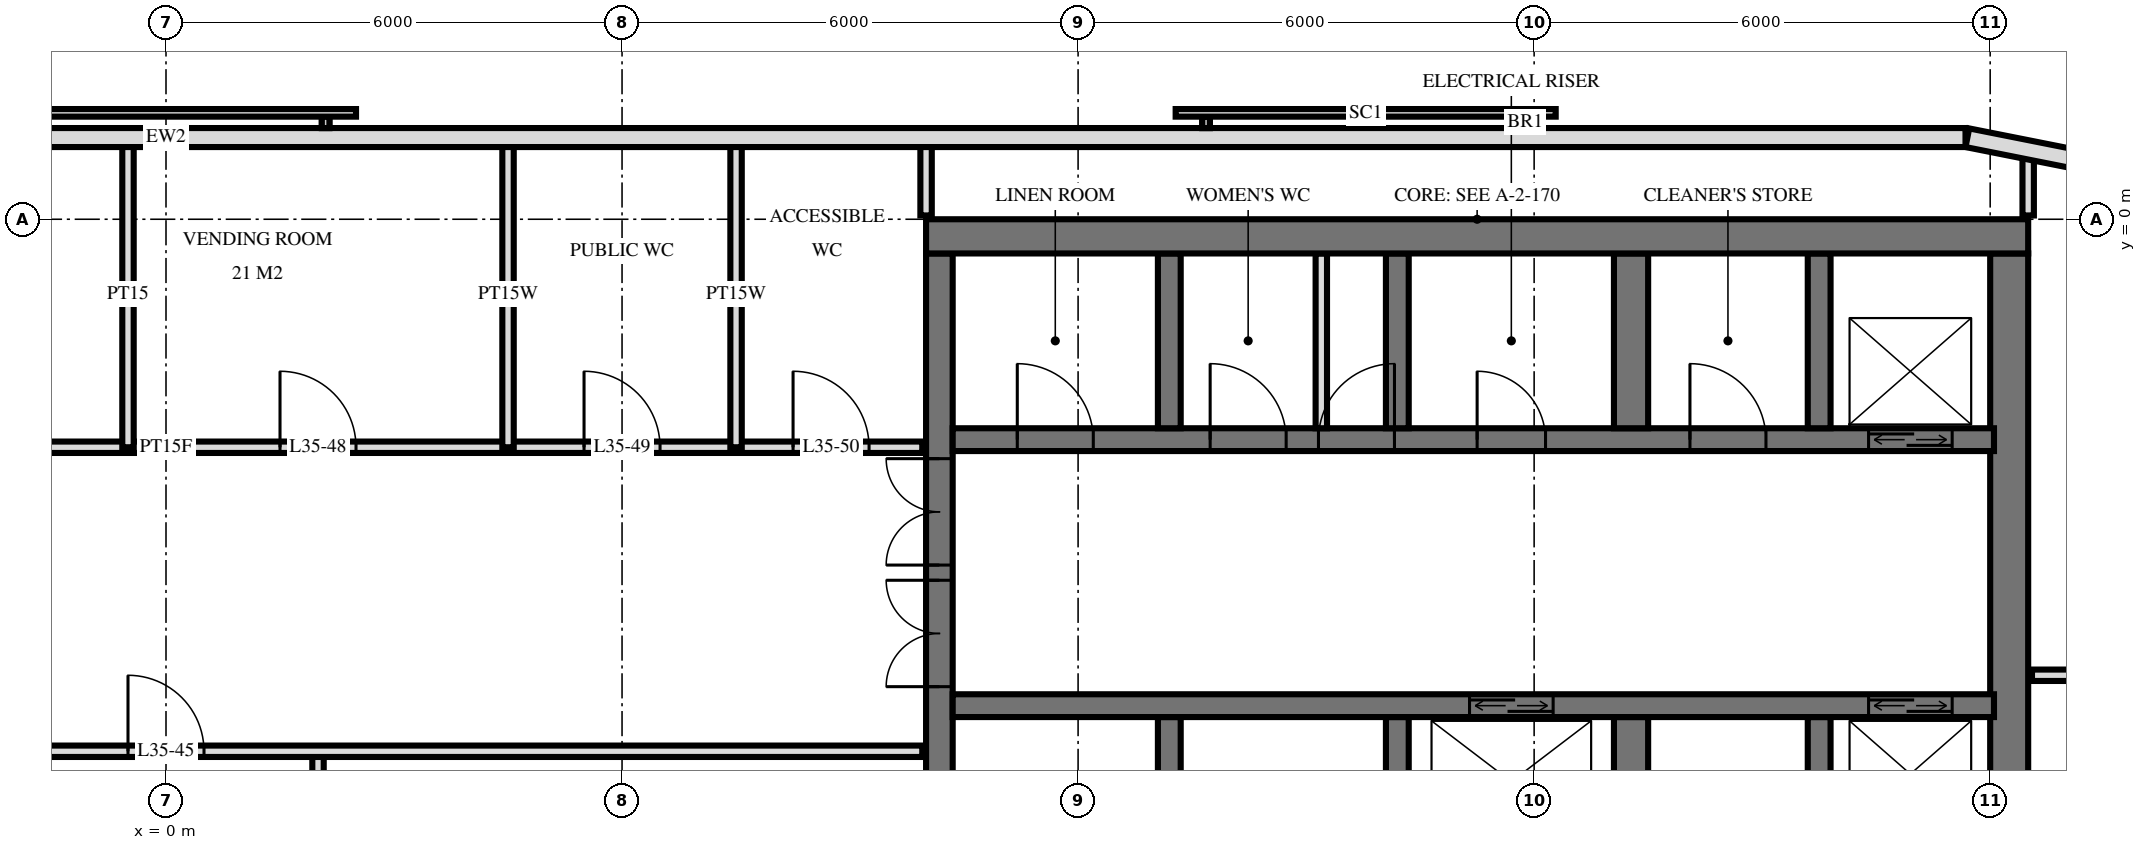
"""IFC4 building model, lengths in metres.
Left out: names, types, materials, properties, quantities, classifications, styles, units other than length and angle.
Written with IfcOpenShell. Run it as: python <this file> out.ifc"""

import sys

from ifc_helpers import new_model, si_unit, direction, frame, frame_2d, origin, place, context, subcontext, project, spatial, rectangle, extrude, element, fill, save


model = new_model("IFC4")
c1 = context("Model", 3, precision=1e-05, world=origin(), true_north=direction((0.0, 1.0)))
c2 = subcontext(c1, "Body", "Model", "MODEL_VIEW")
j1 = project(units=[si_unit("LENGTHUNIT", "METRE"), si_unit("PLANEANGLEUNIT", "RADIAN")], contexts=[c1])
p1 = place(None, origin())
s1 = spatial("IfcSite", under=j1, at=p1, CompositionType="ELEMENT")
p2 = place(p1, origin())
s2 = spatial("IfcBuilding", under=s1, at=p2, CompositionType="ELEMENT")
p3 = place(p2, frame((0.0, 0.0, 138.0)))
s3 = spatial("IfcBuildingStorey", under=s2, at=p3, CompositionType="ELEMENT", Elevation=138.0)
p4 = place(p3, frame((10.0, -0.225, 0.0), z_axis=(0.0, 0.0, 1.0), x_axis=(1.0, 0.0, 0.0)))
e1 = element("IfcWall", 1, at=p4, inside=s3, PredefinedType="SHEAR", context=c2, shape_type="SweptSolid", body=[
    extrude(rectangle(XDim=14.5, YDim=0.45, at=frame_2d((7.25, 0.0))), origin(), (0.0, 0.0, 1.0), 3.6),
])
p5 = place(p3, frame((10.175, -14.55, 0.0), z_axis=(0.0, 0.0, 1.0), x_axis=(0.0, 1.0, 0.0)))
e2 = element("IfcWall", 2, at=p5, inside=s3, PredefinedType="SHEAR", context=c2, shape_type="SweptSolid", body=[
    extrude(rectangle(XDim=14.1, YDim=0.35, at=frame_2d((7.05, 0.0))), origin(), (0.0, 0.0, 1.0), 3.6),
])
p6 = place(p5, frame((8.4, 0.0, 0.0)))
e3 = element("IfcOpeningElement", 3, at=p6, cuts=e2, PredefinedType="OPENING", context=c2, shape_type="SweptSolid", body=[
    extrude(rectangle(XDim=1.4, YDim=2.4, at=frame_2d((0.7, 1.2))), frame((0.0, 0.185, 0.0), z_axis=(0.0, -1.0, 0.0), x_axis=(1.0, 0.0, 0.0)), (0.0, 0.0, 1.0), 0.37),
])
p7 = place(p5, frame((10.0, 0.0, 0.0)))
e4 = element("IfcOpeningElement", 4, at=p7, cuts=e2, PredefinedType="OPENING", context=c2, shape_type="SweptSolid", body=[
    extrude(rectangle(XDim=1.4, YDim=2.4, at=frame_2d((0.7, 1.2))), frame((0.0, 0.185, 0.0), z_axis=(0.0, -1.0, 0.0), x_axis=(1.0, 0.0, 0.0)), (0.0, 0.0, 1.0), 0.37),
])
p8 = place(p5, frame((4.0, 0.0, 0.0)))
e5 = element("IfcOpeningElement", 5, at=p8, cuts=e2, PredefinedType="OPENING", context=c2, shape_type="SweptSolid", body=[
    extrude(rectangle(XDim=1.2, YDim=2.1, at=frame_2d((0.6, 1.05))), frame((0.0, 0.185, 0.0), z_axis=(0.0, -1.0, 0.0), x_axis=(1.0, 0.0, 0.0)), (0.0, 0.0, 1.0), 0.37),
])
p9 = place(p3, frame((24.25, -14.55, 0.0), z_axis=(0.0, 0.0, 1.0), x_axis=(0.0, 1.0, 0.0)))
e6 = element("IfcWall", 6, at=p9, inside=s3, PredefinedType="SHEAR", context=c2, shape_type="SweptSolid", body=[
    extrude(rectangle(XDim=14.1, YDim=0.5, at=frame_2d((7.05, 0.0))), origin(), (0.0, 0.0, 1.0), 3.6),
])
p10 = place(p3, frame((10.35, -2.9, 0.0), z_axis=(0.0, 0.0, 1.0), x_axis=(1.0, 0.0, 0.0)))
e7 = element("IfcWall", 7, at=p10, inside=s3, PredefinedType="SHEAR", context=c2, shape_type="SweptSolid", body=[
    extrude(rectangle(XDim=13.7, YDim=0.3, at=frame_2d((6.85, 0.0))), origin(), (0.0, 0.0, 1.0), 3.6),
])
p11 = place(p10, frame((12.05, 0.0, 0.0)))
e8 = element("IfcOpeningElement", 8, at=p11, cuts=e7, PredefinedType="OPENING", context=c2, shape_type="SweptSolid", body=[
    extrude(rectangle(XDim=1.1, YDim=2.1, at=frame_2d((0.55, 1.05))), frame((0.0, 0.16, 0.0), z_axis=(0.0, -1.0, 0.0), x_axis=(1.0, 0.0, 0.0)), (0.0, 0.0, 1.0), 0.32),
])
p12 = place(p10, frame((6.9, 0.0, 0.0)))
e9 = element("IfcOpeningElement", 9, at=p12, cuts=e7, PredefinedType="OPENING", context=c2, shape_type="SweptSolid", body=[
    extrude(rectangle(XDim=0.9, YDim=2.1, at=frame_2d((0.45, 1.05))), frame((0.0, 0.16, 0.0), z_axis=(0.0, -1.0, 0.0), x_axis=(1.0, 0.0, 0.0)), (0.0, 0.0, 1.0), 0.32),
])
p13 = place(p10, frame((0.85, 0.0, 0.0)))
e10 = element("IfcOpeningElement", 10, at=p13, cuts=e7, PredefinedType="OPENING", context=c2, shape_type="SweptSolid", body=[
    extrude(rectangle(XDim=1.0, YDim=2.1, at=frame_2d((0.5, 1.05))), frame((0.0, 0.16, 0.0), z_axis=(0.0, -1.0, 0.0), x_axis=(1.0, 0.0, 0.0)), (0.0, 0.0, 1.0), 0.32),
])
p14 = place(p10, frame((3.387, 0.0, 0.0)))
e11 = element("IfcOpeningElement", 11, at=p14, cuts=e7, PredefinedType="OPENING", context=c2, shape_type="SweptSolid", body=[
    extrude(rectangle(XDim=1.0, YDim=2.1, at=frame_2d((0.5, 1.05))), frame((0.0, 0.16, 0.0), z_axis=(0.0, -1.0, 0.0), x_axis=(1.0, 0.0, 0.0)), (0.0, 0.0, 1.0), 0.32),
])
p15 = place(p10, frame((4.812, 0.0, 0.0)))
e12 = element("IfcOpeningElement", 12, at=p15, cuts=e7, PredefinedType="OPENING", context=c2, shape_type="SweptSolid", body=[
    extrude(rectangle(XDim=1.0, YDim=2.1, at=frame_2d((0.5, 1.05))), frame((0.0, 0.16, 0.0), z_axis=(0.0, -1.0, 0.0), x_axis=(1.0, 0.0, 0.0)), (0.0, 0.0, 1.0), 0.32),
])
p16 = place(p10, frame((9.7, 0.0, 0.0)))
e13 = element("IfcOpeningElement", 13, at=p16, cuts=e7, PredefinedType="OPENING", context=c2, shape_type="SweptSolid", body=[
    extrude(rectangle(XDim=1.0, YDim=2.1, at=frame_2d((0.5, 1.05))), frame((0.0, 0.16, 0.0), z_axis=(0.0, -1.0, 0.0), x_axis=(1.0, 0.0, 0.0)), (0.0, 0.0, 1.0), 0.32),
])
p17 = place(p3, frame((10.35, -6.4, 0.0), z_axis=(0.0, 0.0, 1.0), x_axis=(1.0, 0.0, 0.0)))
e14 = element("IfcWall", 14, at=p17, inside=s3, PredefinedType="SHEAR", context=c2, shape_type="SweptSolid", body=[
    extrude(rectangle(XDim=13.7, YDim=0.3, at=frame_2d((6.85, 0.0))), origin(), (0.0, 0.0, 1.0), 3.6),
])
p18 = place(p17, frame((12.05, 0.0, 0.0)))
e15 = element("IfcOpeningElement", 15, at=p18, cuts=e14, PredefinedType="OPENING", context=c2, shape_type="SweptSolid", body=[
    extrude(rectangle(XDim=1.1, YDim=2.1, at=frame_2d((0.55, 1.05))), frame((0.0, 0.16, 0.0), z_axis=(0.0, -1.0, 0.0), x_axis=(1.0, 0.0, 0.0)), (0.0, 0.0, 1.0), 0.32),
])
p19 = place(p17, frame((6.8, 0.0, 0.0)))
e16 = element("IfcOpeningElement", 16, at=p19, cuts=e14, PredefinedType="OPENING", context=c2, shape_type="SweptSolid", body=[
    extrude(rectangle(XDim=1.1, YDim=2.1, at=frame_2d((0.55, 1.05))), frame((0.0, 0.16, 0.0), z_axis=(0.0, -1.0, 0.0), x_axis=(1.0, 0.0, 0.0)), (0.0, 0.0, 1.0), 0.32),
])
for number, where, z_axis, x_axis in (
    (17, (13.2, -2.75, 0.0), (0.0, 0.0, 1.0), (0.0, 1.0, 0.0)),
    (18, (13.2, -8.85, 0.0), (0.0, 0.0, 1.0), (0.0, 1.0, 0.0)),
    (19, (16.2, -2.75, 0.0), (0.0, 0.0, 1.0), (0.0, 1.0, 0.0)),
    (20, (16.2, -8.85, 0.0), (0.0, 0.0, 1.0), (0.0, 1.0, 0.0)),
):
    element("IfcWall", number, at=place(p3, frame(where, z_axis=z_axis, x_axis=x_axis)), inside=s3, PredefinedType="SHEAR", context=c2, shape_type="SweptSolid", body=[
        extrude(rectangle(XDim=2.3, YDim=0.3, at=frame_2d((1.15, 0.0))), origin(), (0.0, 0.0, 1.0), 3.6),
    ])
for number, where, z_axis, x_axis in (
    (21, (19.275, -2.75, 0.0), (0.0, 0.0, 1.0), (0.0, 1.0, 0.0)),
    (22, (19.275, -8.85, 0.0), (0.0, 0.0, 1.0), (0.0, 1.0, 0.0)),
):
    element("IfcWall", number, at=place(p3, frame(where, z_axis=z_axis, x_axis=x_axis)), inside=s3, PredefinedType="SHEAR", context=c2, shape_type="SweptSolid", body=[
        extrude(rectangle(XDim=2.3, YDim=0.45, at=frame_2d((1.15, 0.0))), origin(), (0.0, 0.0, 1.0), 3.6),
    ])
for number, where, z_axis, x_axis in (
    (23, (21.75, -2.75, 0.0), (0.0, 0.0, 1.0), (0.0, 1.0, 0.0)),
    (24, (21.75, -8.85, 0.0), (0.0, 0.0, 1.0), (0.0, 1.0, 0.0)),
):
    element("IfcWall", number, at=place(p3, frame(where, z_axis=z_axis, x_axis=x_axis)), inside=s3, PredefinedType="SHEAR", context=c2, shape_type="SweptSolid", body=[
        extrude(rectangle(XDim=2.3, YDim=0.3, at=frame_2d((1.15, 0.0))), origin(), (0.0, 0.0, 1.0), 3.6),
    ])
p20 = place(p3, frame((25.349, 0.745, 0.0), z_axis=(0.0, 0.0, 1.0), x_axis=(-0.980803419081, 0.194999110559, 0.0)))
e25 = element("IfcWall", 25, at=p20, inside=s3, PredefinedType="SOLIDWALL", context=c2, shape_type="SweptSolid", body=[
    extrude(rectangle(XDim=1.681, YDim=0.25, at=frame_2d((0.841, 0.0))), origin(), (0.0, 0.0, 1.0), 3.32),
])
p21 = place(p3, frame((23.675, 1.075, 0.0), z_axis=(0.0, 0.0, 1.0), x_axis=(-1.0, 0.0, 0.0)))
e26 = element("IfcWall", 26, at=p21, inside=s3, PredefinedType="SOLIDWALL", context=c2, shape_type="SweptSolid", body=[
    extrude(rectangle(XDim=47.351, YDim=0.25, at=frame_2d((23.675, 0.0))), origin(), (0.0, 0.0, 1.0), 3.32),
])
p22 = place(p21, frame((27.275, 0.0, 0.3)))
e27 = element("IfcOpeningElement", 27, at=p22, cuts=e26, PredefinedType="OPENING", context=c2, shape_type="SweptSolid", body=[
    extrude(rectangle(XDim=2.4, YDim=2.1, at=frame_2d((1.2, 1.05))), frame((0.0, 0.135, 0.0), z_axis=(0.0, -1.0, 0.0), x_axis=(1.0, 0.0, 0.0)), (0.0, 0.0, 1.0), 0.27),
])
p23 = place(p21, frame((30.275, 0.0, 0.3)))
e28 = element("IfcOpeningElement", 28, at=p23, cuts=e26, PredefinedType="OPENING", context=c2, shape_type="SweptSolid", body=[
    extrude(rectangle(XDim=2.4, YDim=2.1, at=frame_2d((1.2, 1.05))), frame((0.0, 0.135, 0.0), z_axis=(0.0, -1.0, 0.0), x_axis=(1.0, 0.0, 0.0)), (0.0, 0.0, 1.0), 0.27),
])
p24 = place(p3, frame((15.2, -2.75, 0.0), z_axis=(0.0, 0.0, 1.0), x_axis=(0.0, 1.0, 0.0)))
e29 = element("IfcWall", 29, at=p24, inside=s3, PredefinedType="PARTITIONING", context=c2, shape_type="SweptSolid", body=[
    extrude(rectangle(XDim=2.3, YDim=0.15, at=frame_2d((1.15, 0.0))), origin(), (0.0, 0.0, 1.0), 3.3),
])
p25 = place(p3, frame((24.5, 0.05, 0.0), z_axis=(0.0, 0.0, 1.0), x_axis=(0.0, 1.0, 0.0)))
e30 = element("IfcWall", 30, at=p25, inside=s3, PredefinedType="PARTITIONING", context=c2, shape_type="SweptSolid", body=[
    extrude(rectangle(XDim=0.807, YDim=0.15, at=frame_2d((0.404, 0.0))), origin(), (0.0, 0.0, 1.0), 3.32),
])
p26 = place(p3, frame((10.0, 0.05, 0.0), z_axis=(0.0, 0.0, 1.0), x_axis=(0.0, 1.0, 0.0)))
e31 = element("IfcWall", 31, at=p26, inside=s3, PredefinedType="PLUMBINGWALL", context=c2, shape_type="SweptSolid", body=[
    extrude(rectangle(XDim=0.97, YDim=0.15, at=frame_2d((0.485, 0.0))), origin(), (0.0, 0.0, 1.0), 3.32),
])
for number, where, z_axis, x_axis in (
    (32, (7.5, -3.0, 0.0), (0.0, 0.0, 1.0), (0.0, 1.0, 0.0)),
    (33, (4.5, -3.0, 0.0), (0.0, 0.0, 1.0), (0.0, 1.0, 0.0)),
):
    element("IfcWall", number, at=place(p3, frame(where, z_axis=z_axis, x_axis=x_axis)), inside=s3, PredefinedType="PLUMBINGWALL", context=c2, shape_type="SweptSolid", body=[
        extrude(rectangle(XDim=4.02, YDim=0.15, at=frame_2d((2.01, 0.0))), origin(), (0.0, 0.0, 1.0), 3.32),
    ])
p27 = place(p3, frame((2.0, -11.0, 0.0), z_axis=(0.0, 0.0, 1.0), x_axis=(0.0, 1.0, 0.0)))
e34 = element("IfcWall", 34, at=p27, inside=s3, PredefinedType="PARTITIONING", context=c2, shape_type="SweptSolid", body=[
    extrude(rectangle(XDim=4.0, YDim=0.15, at=frame_2d((2.0, 0.0))), origin(), (0.0, 0.0, 1.0), 3.32),
])
p28 = place(p3, frame((-0.5, -3.0, 0.0), z_axis=(0.0, 0.0, 1.0), x_axis=(0.0, 1.0, 0.0)))
e35 = element("IfcWall", 35, at=p28, inside=s3, PredefinedType="PARTITIONING", context=c2, shape_type="SweptSolid", body=[
    extrude(rectangle(XDim=4.02, YDim=0.15, at=frame_2d((2.01, 0.0))), origin(), (0.0, 0.0, 1.0), 3.32),
])
p29 = place(p3, frame((-9.95, -7.0, 0.0), z_axis=(0.0, 0.0, 1.0), x_axis=(1.0, 0.0, 0.0)))
e36 = element("IfcWall", 36, at=p29, inside=s3, PredefinedType="PARTITIONING", context=c2, shape_type="SweptSolid", body=[
    extrude(rectangle(XDim=19.9, YDim=0.15, at=frame_2d((9.95, 0.0))), origin(), (0.0, 0.0, 1.0), 3.32),
])
p30 = place(p29, frame((9.45, 0.0, 0.0)))
e37 = element("IfcOpeningElement", 37, at=p30, cuts=e36, PredefinedType="OPENING", context=c2, shape_type="SweptSolid", body=[
    extrude(rectangle(XDim=1.0, YDim=2.1, at=frame_2d((0.5, 1.05))), frame((0.0, 0.085, 0.0), z_axis=(0.0, -1.0, 0.0), x_axis=(1.0, 0.0, 0.0)), (0.0, 0.0, 1.0), 0.17),
])
p31 = place(p29, frame((3.45, 0.0, 0.0)))
e38 = element("IfcOpeningElement", 38, at=p31, cuts=e36, PredefinedType="OPENING", context=c2, shape_type="SweptSolid", body=[
    extrude(rectangle(XDim=1.0, YDim=2.1, at=frame_2d((0.5, 1.05))), frame((0.0, 0.085, 0.0), z_axis=(0.0, -1.0, 0.0), x_axis=(1.0, 0.0, 0.0)), (0.0, 0.0, 1.0), 0.17),
])
p32 = place(p3, frame((24.55, -6.0, 0.0), z_axis=(0.0, 0.0, 1.0), x_axis=(1.0, 0.0, 0.0)))
e39 = element("IfcWall", 39, at=p32, inside=s3, PredefinedType="PARTITIONING", context=c2, shape_type="SweptSolid", body=[
    extrude(rectangle(XDim=3.47, YDim=0.15, at=frame_2d((1.735, 0.0))), origin(), (0.0, 0.0, 1.0), 3.32),
])
p33 = place(p32, frame((1.35, 0.0, 0.0)))
e40 = element("IfcOpeningElement", 40, at=p33, cuts=e39, PredefinedType="OPENING", context=c2, shape_type="SweptSolid", body=[
    extrude(rectangle(XDim=0.9, YDim=2.1, at=frame_2d((0.45, 1.05))), frame((0.0, 0.085, 0.0), z_axis=(0.0, -1.0, 0.0), x_axis=(1.0, 0.0, 0.0)), (0.0, 0.0, 1.0), 0.17),
])
p34 = place(p3, frame((-9.95, -3.0, 0.0), z_axis=(0.0, 0.0, 1.0), x_axis=(1.0, 0.0, 0.0)))
e41 = element("IfcWall", 41, at=p34, inside=s3, PredefinedType="PARTITIONING", context=c2, shape_type="SweptSolid", body=[
    extrude(rectangle(XDim=19.9, YDim=0.15, at=frame_2d((9.95, 0.0))), origin(), (0.0, 0.0, 1.0), 3.32),
])
p35 = place(p34, frame((4.2, 0.0, 0.0)))
e42 = element("IfcOpeningElement", 42, at=p35, cuts=e41, PredefinedType="OPENING", context=c2, shape_type="SweptSolid", body=[
    extrude(rectangle(XDim=1.0, YDim=2.1, at=frame_2d((0.5, 1.05))), frame((0.0, 0.085, 0.0), z_axis=(0.0, -1.0, 0.0), x_axis=(1.0, 0.0, 0.0)), (0.0, 0.0, 1.0), 0.17),
])
p36 = place(p34, frame((11.45, 0.0, 0.0)))
e43 = element("IfcOpeningElement", 43, at=p36, cuts=e41, PredefinedType="OPENING", context=c2, shape_type="SweptSolid", body=[
    extrude(rectangle(XDim=1.0, YDim=2.1, at=frame_2d((0.5, 1.05))), frame((0.0, 0.085, 0.0), z_axis=(0.0, -1.0, 0.0), x_axis=(1.0, 0.0, 0.0)), (0.0, 0.0, 1.0), 0.17),
])
p37 = place(p34, frame((15.45, 0.0, 0.0)))
e44 = element("IfcOpeningElement", 44, at=p37, cuts=e41, PredefinedType="OPENING", context=c2, shape_type="SweptSolid", body=[
    extrude(rectangle(XDim=1.0, YDim=2.1, at=frame_2d((0.5, 1.05))), frame((0.0, 0.085, 0.0), z_axis=(0.0, -1.0, 0.0), x_axis=(1.0, 0.0, 0.0)), (0.0, 0.0, 1.0), 0.17),
])
p38 = place(p34, frame((18.2, 0.0, 0.0)))
e45 = element("IfcOpeningElement", 45, at=p38, cuts=e41, PredefinedType="OPENING", context=c2, shape_type="SweptSolid", body=[
    extrude(rectangle(XDim=1.0, YDim=2.1, at=frame_2d((0.5, 1.05))), frame((0.0, 0.085, 0.0), z_axis=(0.0, -1.0, 0.0), x_axis=(1.0, 0.0, 0.0)), (0.0, 0.0, 1.0), 0.17),
])
p39 = place(p11, origin())
e46 = element("IfcDoor", 46, at=p39, inside=s3, OperationType="DOUBLE_DOOR_SLIDING", PredefinedType="USERDEFINED", context=c2, shape_type="SweptSolid", body=[
    extrude(rectangle(XDim=1.1, YDim=2.1, at=frame_2d((0.55, 1.05))), frame((0.0, 0.025, 0.0), z_axis=(0.0, -1.0, 0.0), x_axis=(1.0, 0.0, 0.0)), (0.0, 0.0, 1.0), 0.05),
])
fill(e8, e46)
p40 = place(p18, origin())
e47 = element("IfcDoor", 47, at=p40, inside=s3, OperationType="DOUBLE_DOOR_SLIDING", PredefinedType="USERDEFINED", context=c2, shape_type="SweptSolid", body=[
    extrude(rectangle(XDim=1.1, YDim=2.1, at=frame_2d((0.55, 1.05))), frame((0.0, 0.025, 0.0), z_axis=(0.0, -1.0, 0.0), x_axis=(1.0, 0.0, 0.0)), (0.0, 0.0, 1.0), 0.05),
])
fill(e15, e47)
p41 = place(p19, origin())
e48 = element("IfcDoor", 48, at=p41, inside=s3, OperationType="DOUBLE_DOOR_SLIDING", PredefinedType="USERDEFINED", context=c2, shape_type="SweptSolid", body=[
    extrude(rectangle(XDim=1.1, YDim=2.1, at=frame_2d((0.55, 1.05))), frame((0.0, 0.025, 0.0), z_axis=(0.0, -1.0, 0.0), x_axis=(1.0, 0.0, 0.0)), (0.0, 0.0, 1.0), 0.05),
])
fill(e16, e48)
p42 = place(p6, origin())
e49 = element("IfcDoor", 49, at=p42, inside=s3, OperationType="DOUBLE_DOOR_SINGLE_SWING", PredefinedType="DOOR", context=c2, shape_type="SweptSolid", body=[
    extrude(rectangle(XDim=1.4, YDim=2.4, at=frame_2d((0.7, 1.2))), frame((0.0, 0.025, 0.0), z_axis=(0.0, -1.0, 0.0), x_axis=(1.0, 0.0, 0.0)), (0.0, 0.0, 1.0), 0.05),
])
fill(e3, e49)
p43 = place(p7, origin())
e50 = element("IfcDoor", 50, at=p43, inside=s3, OperationType="DOUBLE_DOOR_SINGLE_SWING", PredefinedType="DOOR", context=c2, shape_type="SweptSolid", body=[
    extrude(rectangle(XDim=1.4, YDim=2.4, at=frame_2d((0.7, 1.2))), frame((0.0, 0.025, 0.0), z_axis=(0.0, -1.0, 0.0), x_axis=(1.0, 0.0, 0.0)), (0.0, 0.0, 1.0), 0.05),
])
fill(e4, e50)
p44 = place(p12, origin())
e51 = element("IfcDoor", 51, at=p44, inside=s3, OperationType="SINGLE_SWING_RIGHT", PredefinedType="DOOR", context=c2, shape_type="SweptSolid", body=[
    extrude(rectangle(XDim=0.9, YDim=2.1, at=frame_2d((0.45, 1.05))), frame((0.0, 0.025, 0.0), z_axis=(0.0, -1.0, 0.0), x_axis=(1.0, 0.0, 0.0)), (0.0, 0.0, 1.0), 0.05),
])
fill(e9, e51)
p45 = place(p13, origin())
e52 = element("IfcDoor", 52, at=p45, inside=s3, OperationType="SINGLE_SWING_RIGHT", PredefinedType="DOOR", context=c2, shape_type="SweptSolid", body=[
    extrude(rectangle(XDim=1.0, YDim=2.1, at=frame_2d((0.5, 1.05))), frame((0.0, 0.025, 0.0), z_axis=(0.0, -1.0, 0.0), x_axis=(1.0, 0.0, 0.0)), (0.0, 0.0, 1.0), 0.05),
])
fill(e10, e52)
p46 = place(p14, origin())
e53 = element("IfcDoor", 53, at=p46, inside=s3, OperationType="SINGLE_SWING_RIGHT", PredefinedType="DOOR", context=c2, shape_type="SweptSolid", body=[
    extrude(rectangle(XDim=1.0, YDim=2.1, at=frame_2d((0.5, 1.05))), frame((0.0, 0.025, 0.0), z_axis=(0.0, -1.0, 0.0), x_axis=(1.0, 0.0, 0.0)), (0.0, 0.0, 1.0), 0.05),
])
fill(e11, e53)
p47 = place(p15, origin())
e54 = element("IfcDoor", 54, at=p47, inside=s3, OperationType="SINGLE_SWING_LEFT", PredefinedType="DOOR", context=c2, shape_type="SweptSolid", body=[
    extrude(rectangle(XDim=1.0, YDim=2.1, at=frame_2d((0.5, 1.05))), frame((0.0, 0.025, 0.0), z_axis=(0.0, -1.0, 0.0), x_axis=(1.0, 0.0, 0.0)), (0.0, 0.0, 1.0), 0.05),
])
fill(e12, e54)
p48 = place(p16, origin())
e55 = element("IfcDoor", 55, at=p48, inside=s3, OperationType="SINGLE_SWING_RIGHT", PredefinedType="DOOR", context=c2, shape_type="SweptSolid", body=[
    extrude(rectangle(XDim=1.0, YDim=2.1, at=frame_2d((0.5, 1.05))), frame((0.0, 0.025, 0.0), z_axis=(0.0, -1.0, 0.0), x_axis=(1.0, 0.0, 0.0)), (0.0, 0.0, 1.0), 0.05),
])
fill(e13, e55)
p49 = place(p30, origin())
e56 = element("IfcDoor", 56, at=p49, inside=s3, OperationType="SINGLE_SWING_RIGHT", PredefinedType="DOOR", context=c2, shape_type="SweptSolid", body=[
    extrude(rectangle(XDim=1.0, YDim=2.1, at=frame_2d((0.5, 1.05))), frame((0.0, 0.025, 0.0), z_axis=(0.0, -1.0, 0.0), x_axis=(1.0, 0.0, 0.0)), (0.0, 0.0, 1.0), 0.05),
])
fill(e37, e56)
p50 = place(p36, origin())
e57 = element("IfcDoor", 57, at=p50, inside=s3, OperationType="SINGLE_SWING_RIGHT", PredefinedType="DOOR", context=c2, shape_type="SweptSolid", body=[
    extrude(rectangle(XDim=1.0, YDim=2.1, at=frame_2d((0.5, 1.05))), frame((0.0, 0.025, 0.0), z_axis=(0.0, -1.0, 0.0), x_axis=(1.0, 0.0, 0.0)), (0.0, 0.0, 1.0), 0.05),
])
fill(e43, e57)
p51 = place(p37, origin())
e58 = element("IfcDoor", 58, at=p51, inside=s3, OperationType="SINGLE_SWING_RIGHT", PredefinedType="DOOR", context=c2, shape_type="SweptSolid", body=[
    extrude(rectangle(XDim=1.0, YDim=2.1, at=frame_2d((0.5, 1.05))), frame((0.0, 0.025, 0.0), z_axis=(0.0, -1.0, 0.0), x_axis=(1.0, 0.0, 0.0)), (0.0, 0.0, 1.0), 0.05),
])
fill(e44, e58)
p52 = place(p38, origin())
e59 = element("IfcDoor", 59, at=p52, inside=s3, OperationType="SINGLE_SWING_RIGHT", PredefinedType="DOOR", context=c2, shape_type="SweptSolid", body=[
    extrude(rectangle(XDim=1.0, YDim=2.1, at=frame_2d((0.5, 1.05))), frame((0.0, 0.025, 0.0), z_axis=(0.0, -1.0, 0.0), x_axis=(1.0, 0.0, 0.0)), (0.0, 0.0, 1.0), 0.05),
])
fill(e45, e59)
save(model, sys.argv[1])
